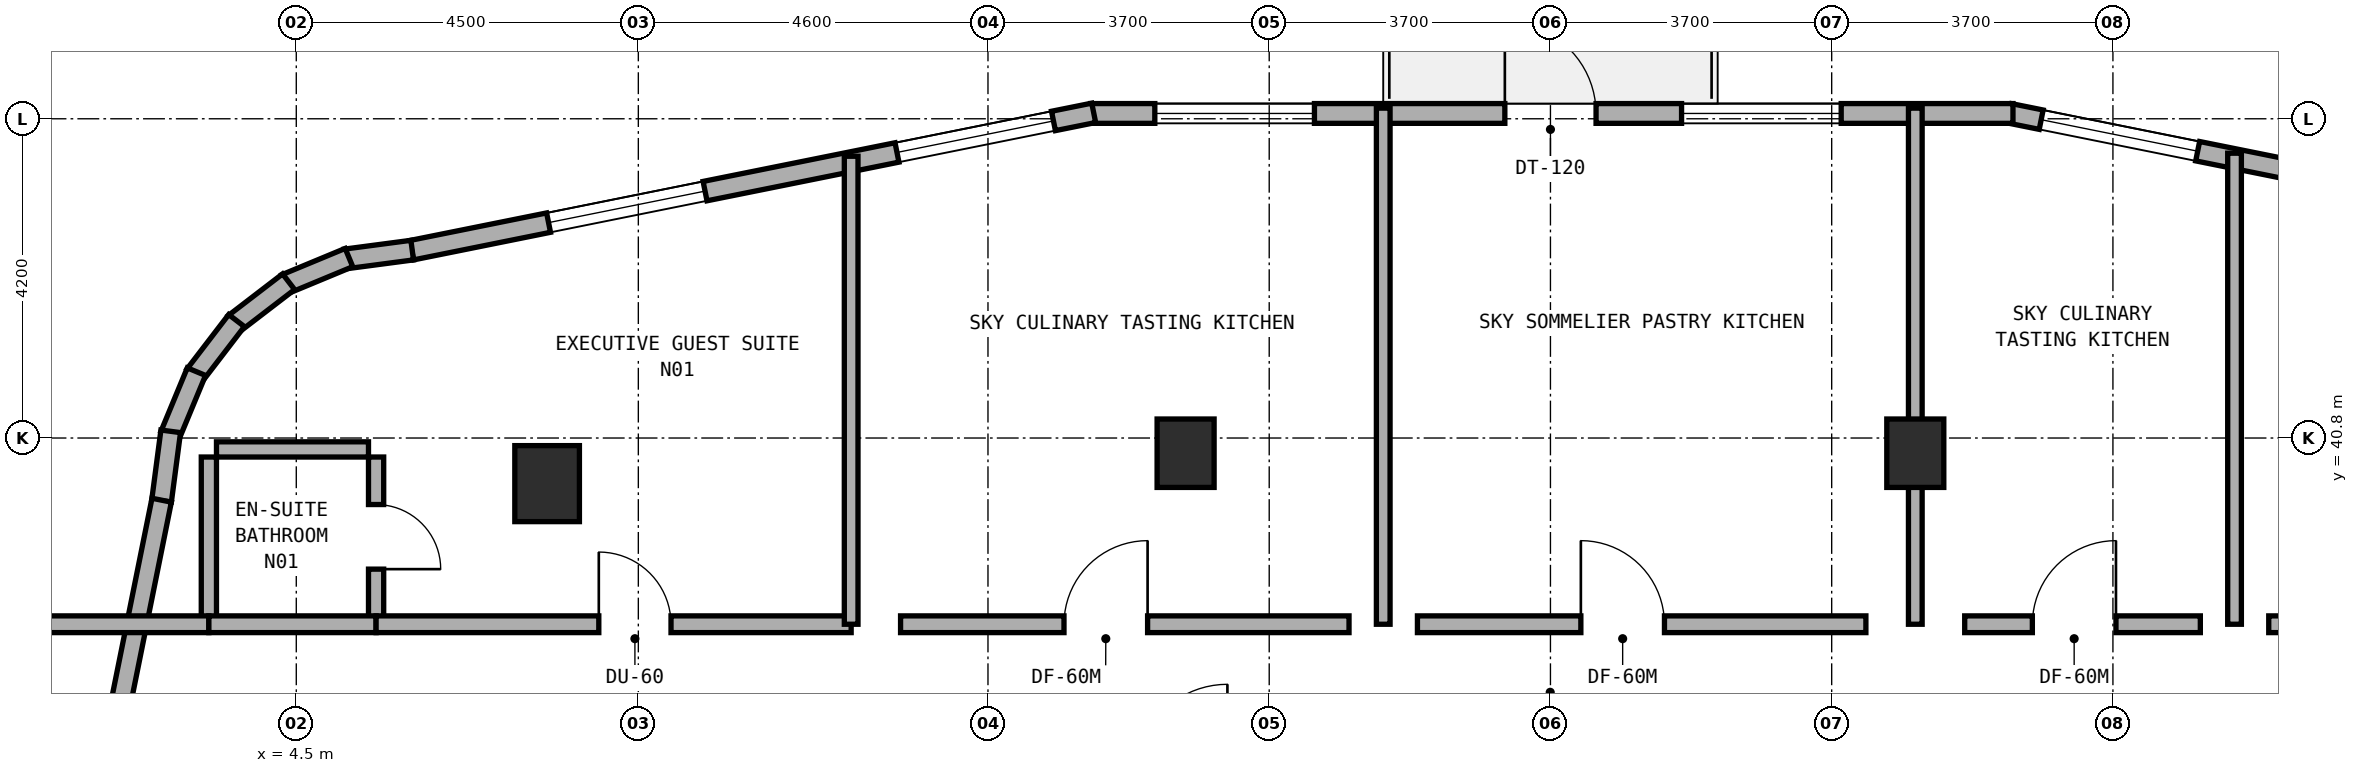
"""IFC4 building model, lengths in metres.
Left out: names, types, materials, properties, quantities, classifications, styles, units other than length and angle.
Written with IfcOpenShell. Run it as: python <this file> out.ifc"""

import sys

from ifc_helpers import new_model, si_unit, direction, frame, frame_2d, origin, origin_2d, place, context, subcontext, project, spatial, rectangle, extrude, element, fill, save


model = new_model("IFC4")
c1 = context("Model", 3, precision=1e-05, world=origin(), true_north=direction((0.0, 1.0)))
c2 = subcontext(c1, "Body", "Model", "MODEL_VIEW")
j1 = project(units=[si_unit("LENGTHUNIT", "METRE"), si_unit("PLANEANGLEUNIT", "RADIAN")], contexts=[c1])
p1 = place(None, origin())
s1 = spatial("IfcSite", under=j1, at=p1, CompositionType="ELEMENT")
p2 = place(p1, origin())
s2 = spatial("IfcBuilding", under=s1, at=p2, CompositionType="ELEMENT")
p3 = place(p2, frame((0.0, 0.0, 166.0)))
s3 = spatial("IfcBuildingStorey", under=s2, at=p3, CompositionType="ELEMENT", Elevation=166.0)
for number, where, z_axis, x_axis in (
    (1, (16.2, 40.6, 0.0), (0.0, 0.0, 1.0), (1.0, 0.0, 0.0)),
    (2, (25.8, 40.6, 0.0), (0.0, 0.0, 1.0), (1.0, 0.0, 0.0)),
):
    element("IfcColumn", number, at=place(p3, frame(where, z_axis=z_axis, x_axis=x_axis)), inside=s3, PredefinedType="COLUMN", context=c2, shape_type="SweptSolid", body=[
        extrude(rectangle(XDim=0.75, YDim=0.9, at=origin_2d()), origin(), (0.0, 0.0, 1.0), 3.5),
    ])
p4 = place(p3, frame((7.8, 40.2, 0.0), z_axis=(0.0, 0.0, 1.0), x_axis=(1.0, 0.0, 0.0)))
e3 = element("IfcColumn", 3, at=p4, inside=s3, PredefinedType="COLUMN", context=c2, shape_type="SweptSolid", body=[
    extrude(rectangle(XDim=0.85, YDim=1.0, at=origin_2d()), origin(), (0.0, 0.0, 1.0), 3.5),
])
p5 = place(p3, frame((35.982, 43.271, 0.0), z_axis=(0.0, 0.0, 1.0), x_axis=(-0.980317172899, 0.197429077186, 0.0)))
e4 = element("IfcWall", 4, at=p5, inside=s3, PredefinedType="STANDARD", context=c2, shape_type="SweptSolid", body=[
    extrude(rectangle(XDim=9.117, YDim=0.26, at=frame_2d((4.559, 0.0))), origin(), (0.0, 0.0, 1.0), 3.22),
])
p6 = place(p5, frame((2.885, 0.0, 0.85)))
e5 = element("IfcOpeningElement", 5, at=p6, cuts=e4, PredefinedType="OPENING", context=c2, shape_type="SweptSolid", body=[
    extrude(rectangle(XDim=2.1, YDim=1.5, at=frame_2d((1.05, 0.75))), frame((0.0, 0.14, 0.0), z_axis=(0.0, -1.0, 0.0), x_axis=(1.0, 0.0, 0.0)), (0.0, 0.0, 1.0), 0.28),
])
p7 = place(p5, frame((6.597, 0.0, 0.85)))
e6 = element("IfcOpeningElement", 6, at=p7, cuts=e4, PredefinedType="OPENING", context=c2, shape_type="SweptSolid", body=[
    extrude(rectangle(XDim=2.1, YDim=1.5, at=frame_2d((1.05, 0.75))), frame((0.0, 0.14, 0.0), z_axis=(0.0, -1.0, 0.0), x_axis=(1.0, 0.0, 0.0)), (0.0, 0.0, 1.0), 0.28),
])
p8 = place(p3, frame((27.085, 45.07, 0.0), z_axis=(0.0, 0.0, 1.0), x_axis=(-1.0, 0.0, 0.0)))
e7 = element("IfcWall", 7, at=p8, inside=s3, PredefinedType="STANDARD", context=c2, shape_type="SweptSolid", body=[
    extrude(rectangle(XDim=12.135, YDim=0.26, at=frame_2d((6.067, 0.0))), origin(), (0.0, 0.0, 1.0), 3.22),
])
p9 = place(p8, frame((5.485, 0.0, 0.0)))
e8 = element("IfcOpeningElement", 8, at=p9, cuts=e7, PredefinedType="OPENING", context=c2, shape_type="SweptSolid", body=[
    extrude(rectangle(XDim=1.2, YDim=2.15, at=frame_2d((0.6, 1.075))), frame((0.0, 0.14, 0.0), z_axis=(0.0, -1.0, 0.0), x_axis=(1.0, 0.0, 0.0)), (0.0, 0.0, 1.0), 0.28),
])
p10 = place(p8, frame((2.26, 0.0, 0.85)))
e9 = element("IfcOpeningElement", 9, at=p10, cuts=e7, PredefinedType="OPENING", context=c2, shape_type="SweptSolid", body=[
    extrude(rectangle(XDim=2.1, YDim=1.5, at=frame_2d((1.05, 0.75))), frame((0.0, 0.14, 0.0), z_axis=(0.0, -1.0, 0.0), x_axis=(1.0, 0.0, 0.0)), (0.0, 0.0, 1.0), 0.28),
])
p11 = place(p8, frame((9.19, 0.0, 0.85)))
e10 = element("IfcOpeningElement", 10, at=p11, cuts=e7, PredefinedType="OPENING", context=c2, shape_type="SweptSolid", body=[
    extrude(rectangle(XDim=2.1, YDim=1.5, at=frame_2d((1.05, 0.75))), frame((0.0, 0.14, 0.0), z_axis=(0.0, -1.0, 0.0), x_axis=(1.0, 0.0, 0.0)), (0.0, 0.0, 1.0), 0.28),
])
p12 = place(p3, frame((14.991, 45.078, 0.0), z_axis=(0.0, 0.0, 1.0), x_axis=(-0.980321298532, -0.197408590603, 0.0)))
e11 = element("IfcWall", 11, at=p12, inside=s3, PredefinedType="STANDARD", context=c2, shape_type="SweptSolid", body=[
    extrude(rectangle(XDim=9.153, YDim=0.26, at=frame_2d((4.577, 0.0))), origin(), (0.0, 0.0, 1.0), 3.22),
])
p13 = place(p12, frame((0.54, 0.0, 0.85)))
e12 = element("IfcOpeningElement", 12, at=p13, cuts=e11, PredefinedType="OPENING", context=c2, shape_type="SweptSolid", body=[
    extrude(rectangle(XDim=2.1, YDim=1.5, at=frame_2d((1.05, 0.75))), frame((0.0, 0.14, 0.0), z_axis=(0.0, -1.0, 0.0), x_axis=(1.0, 0.0, 0.0)), (0.0, 0.0, 1.0), 0.28),
])
p14 = place(p12, frame((5.216, 0.0, 0.85)))
e13 = element("IfcOpeningElement", 13, at=p14, cuts=e11, PredefinedType="OPENING", context=c2, shape_type="SweptSolid", body=[
    extrude(rectangle(XDim=2.1, YDim=1.5, at=frame_2d((1.05, 0.75))), frame((0.0, 0.14, 0.0), z_axis=(0.0, -1.0, 0.0), x_axis=(1.0, 0.0, 0.0)), (0.0, 0.0, 1.0), 0.28),
])
p15 = place(p3, frame((6.025, 43.272, 0.0), z_axis=(0.0, 0.0, 1.0), x_axis=(-0.991388484223, -0.130953706898, 0.0)))
e14 = element("IfcWall", 14, at=p15, inside=s3, PredefinedType="STANDARD", context=c2, shape_type="SweptSolid", body=[
    extrude(rectangle(XDim=0.885, YDim=0.26, at=frame_2d((0.443, 0.0))), origin(), (0.0, 0.0, 1.0), 3.22),
])
p16 = place(p3, frame((5.193, 43.174, 0.0), z_axis=(0.0, 0.0, 1.0), x_axis=(-0.923627776508, -0.383290660547, 0.0)))
e15 = element("IfcWall", 15, at=p16, inside=s3, PredefinedType="STANDARD", context=c2, shape_type="SweptSolid", body=[
    extrude(rectangle(XDim=0.903, YDim=0.26, at=frame_2d((0.452, 0.0))), origin(), (0.0, 0.0, 1.0), 3.22),
])
p17 = place(p3, frame((4.399, 42.856, 0.0), z_axis=(0.0, 0.0, 1.0), x_axis=(-0.793458244748, -0.608624690463, 0.0)))
e16 = element("IfcWall", 16, at=p17, inside=s3, PredefinedType="STANDARD", context=c2, shape_type="SweptSolid", body=[
    extrude(rectangle(XDim=0.902, YDim=0.26, at=frame_2d((0.451, 0.0))), origin(), (0.0, 0.0, 1.0), 3.22),
])
p18 = place(p3, frame((3.714, 42.345, 0.0), z_axis=(0.0, 0.0, 1.0), x_axis=(-0.608494022858, -0.793558456666, 0.0)))
e17 = element("IfcWall", 17, at=p18, inside=s3, PredefinedType="STANDARD", context=c2, shape_type="SweptSolid", body=[
    extrude(rectangle(XDim=0.902, YDim=0.26, at=frame_2d((0.451, 0.0))), origin(), (0.0, 0.0, 1.0), 3.22),
])
p19 = place(p3, frame((3.186, 41.673, 0.0), z_axis=(0.0, 0.0, 1.0), x_axis=(-0.383155708213, -0.923683767999, 0.0)))
e18 = element("IfcWall", 18, at=p19, inside=s3, PredefinedType="STANDARD", context=c2, shape_type="SweptSolid", body=[
    extrude(rectangle(XDim=0.903, YDim=0.26, at=frame_2d((0.451, 0.0))), origin(), (0.0, 0.0, 1.0), 3.22),
])
p20 = place(p3, frame((2.848, 40.888, 0.0), z_axis=(0.0, 0.0, 1.0), x_axis=(-0.130200706103, -0.991487658083, 0.0)))
e19 = element("IfcWall", 19, at=p20, inside=s3, PredefinedType="STANDARD", context=c2, shape_type="SweptSolid", body=[
    extrude(rectangle(XDim=0.921, YDim=0.26, at=frame_2d((0.46, 0.0))), origin(), (0.0, 0.0, 1.0), 3.22),
])
p21 = place(p3, frame((2.729, 39.982, 0.0), z_axis=(0.0, 0.0, 1.0), x_axis=(-0.197435082048, -0.980315963543, 0.0)))
e20 = element("IfcWall", 20, at=p21, inside=s3, PredefinedType="STANDARD", context=c2, shape_type="SweptSolid", body=[
    extrude(rectangle(XDim=9.183, YDim=0.26, at=frame_2d((4.591, 0.0))), origin(), (0.0, 0.0, 1.0), 3.22),
])
p22 = place(p21, frame((4.436, 0.0, 0.85)))
e21 = element("IfcOpeningElement", 21, at=p22, cuts=e20, PredefinedType="OPENING", context=c2, shape_type="SweptSolid", body=[
    extrude(rectangle(XDim=2.1, YDim=1.5, at=frame_2d((1.05, 0.75))), frame((0.0, 0.14, 0.0), z_axis=(0.0, -1.0, 0.0), x_axis=(1.0, 0.0, 0.0)), (0.0, 0.0, 1.0), 0.28),
])
p23 = place(p3, frame((5.55, 38.45, 0.0), z_axis=(0.0, 0.0, 1.0), x_axis=(0.0, 1.0, 0.0)))
e22 = element("IfcWall", 22, at=p23, inside=s3, PredefinedType="PLUMBINGWALL", context=c2, shape_type="SweptSolid", body=[
    extrude(rectangle(XDim=2.1, YDim=0.2, at=frame_2d((1.05, 0.0))), origin(), (0.0, 0.0, 1.0), 3.22),
])
p24 = place(p23, frame((0.625, 0.0, 0.0)))
e23 = element("IfcOpeningElement", 23, at=p24, cuts=e22, PredefinedType="OPENING", context=c2, shape_type="SweptSolid", body=[
    extrude(rectangle(XDim=0.85, YDim=2.1, at=frame_2d((0.425, 1.05))), frame((0.0, 0.11, 0.0), z_axis=(0.0, -1.0, 0.0), x_axis=(1.0, 0.0, 0.0)), (0.0, 0.0, 1.0), 0.22),
])
p25 = place(p3, frame((3.45, 40.65, 0.0), z_axis=(0.0, 0.0, 1.0), x_axis=(1.0, 0.0, 0.0)))
e24 = element("IfcWall", 24, at=p25, inside=s3, PredefinedType="PLUMBINGWALL", context=c2, shape_type="SweptSolid", body=[
    extrude(rectangle(XDim=2.0, YDim=0.2, at=frame_2d((1.0, 0.0))), origin(), (0.0, 0.0, 1.0), 3.22),
])
p26 = place(p3, frame((3.35, 38.45, 0.0), z_axis=(0.0, 0.0, 1.0), x_axis=(0.0, 1.0, 0.0)))
e25 = element("IfcWall", 25, at=p26, inside=s3, PredefinedType="PLUMBINGWALL", context=c2, shape_type="SweptSolid", body=[
    extrude(rectangle(XDim=2.1, YDim=0.2, at=frame_2d((1.05, 0.0))), origin(), (0.0, 0.0, 1.0), 3.22),
])
p27 = place(p3, frame((0.96, 38.35, 0.0), z_axis=(0.0, 0.0, 1.0), x_axis=(1.0, 0.0, 0.0)))
e26 = element("IfcWall", 26, at=p27, inside=s3, PredefinedType="SOLIDWALL", context=c2, shape_type="SweptSolid", body=[
    extrude(rectangle(XDim=2.39, YDim=0.22, at=frame_2d((1.195, 0.0))), origin(), (0.0, 0.0, 1.0), 3.22),
])
p28 = place(p3, frame((3.35, 38.35, 0.0), z_axis=(0.0, 0.0, 1.0), x_axis=(1.0, 0.0, 0.0)))
e27 = element("IfcWall", 27, at=p28, inside=s3, PredefinedType="SOLIDWALL", context=c2, shape_type="SweptSolid", body=[
    extrude(rectangle(XDim=2.2, YDim=0.22, at=frame_2d((1.1, 0.0))), origin(), (0.0, 0.0, 1.0), 3.22),
])
p29 = place(p3, frame((5.55, 38.35, 0.0), z_axis=(0.0, 0.0, 1.0), x_axis=(1.0, 0.0, 0.0)))
e28 = element("IfcWall", 28, at=p29, inside=s3, PredefinedType="SOLIDWALL", context=c2, shape_type="SweptSolid", body=[
    extrude(rectangle(XDim=6.25, YDim=0.22, at=frame_2d((3.125, 0.0))), origin(), (0.0, 0.0, 1.0), 2.795),
])
p30 = place(p29, frame((2.93, 0.0, 0.0)))
e29 = element("IfcOpeningElement", 29, at=p30, cuts=e28, PredefinedType="OPENING", context=c2, shape_type="SweptSolid", body=[
    extrude(rectangle(XDim=0.95, YDim=2.1, at=frame_2d((0.475, 1.05))), frame((0.0, 0.12, 0.0), z_axis=(0.0, -1.0, 0.0), x_axis=(1.0, 0.0, 0.0)), (0.0, 0.0, 1.0), 0.24),
])
p31 = place(p3, frame((11.8, 38.35, 0.0), z_axis=(0.0, 0.0, 1.0), x_axis=(0.0, 1.0, 0.0)))
e30 = element("IfcWall", 30, at=p31, inside=s3, PredefinedType="SOLIDWALL", context=c2, shape_type="SweptSolid", body=[
    extrude(rectangle(XDim=6.157, YDim=0.18, at=frame_2d((3.079, 0.0))), origin(), (0.0, 0.0, 1.0), 2.835),
])
p32 = place(p3, frame((18.8, 38.35, 0.0), z_axis=(0.0, 0.0, 1.0), x_axis=(0.0, 1.0, 0.0)))
e31 = element("IfcWall", 31, at=p32, inside=s3, PredefinedType="SOLIDWALL", context=c2, shape_type="SweptSolid", body=[
    extrude(rectangle(XDim=6.79, YDim=0.18, at=frame_2d((3.395, 0.0))), origin(), (0.0, 0.0, 1.0), 2.835),
])
p33 = place(p3, frame((12.45, 38.35, 0.0), z_axis=(0.0, 0.0, 1.0), x_axis=(1.0, 0.0, 0.0)))
e32 = element("IfcWall", 32, at=p33, inside=s3, PredefinedType="SOLIDWALL", context=c2, shape_type="SweptSolid", body=[
    extrude(rectangle(XDim=5.9, YDim=0.22, at=frame_2d((2.95, 0.0))), origin(), (0.0, 0.0, 1.0), 2.795),
])
p34 = place(p33, frame((2.15, 0.0, 0.0)))
e33 = element("IfcOpeningElement", 33, at=p34, cuts=e32, PredefinedType="OPENING", context=c2, shape_type="SweptSolid", body=[
    extrude(rectangle(XDim=1.1, YDim=2.1, at=frame_2d((0.55, 1.05))), frame((0.0, 0.12, 0.0), z_axis=(0.0, -1.0, 0.0), x_axis=(1.0, 0.0, 0.0)), (0.0, 0.0, 1.0), 0.24),
])
p35 = place(p3, frame((19.25, 38.35, 0.0), z_axis=(0.0, 0.0, 1.0), x_axis=(1.0, 0.0, 0.0)))
e34 = element("IfcWall", 34, at=p35, inside=s3, PredefinedType="SOLIDWALL", context=c2, shape_type="SweptSolid", body=[
    extrude(rectangle(XDim=5.9, YDim=0.22, at=frame_2d((2.95, 0.0))), origin(), (0.0, 0.0, 1.0), 3.22),
])
p36 = place(p35, frame((2.15, 0.0, 0.0)))
e35 = element("IfcOpeningElement", 35, at=p36, cuts=e34, PredefinedType="OPENING", context=c2, shape_type="SweptSolid", body=[
    extrude(rectangle(XDim=1.1, YDim=2.1, at=frame_2d((0.55, 1.05))), frame((0.0, 0.12, 0.0), z_axis=(0.0, -1.0, 0.0), x_axis=(1.0, 0.0, 0.0)), (0.0, 0.0, 1.0), 0.24),
])
p37 = place(p3, frame((25.8, 38.35, 0.0), z_axis=(0.0, 0.0, 1.0), x_axis=(0.0, 1.0, 0.0)))
e36 = element("IfcWall", 36, at=p37, inside=s3, PredefinedType="SOLIDWALL", context=c2, shape_type="SweptSolid", body=[
    extrude(rectangle(XDim=6.79, YDim=0.18, at=frame_2d((3.395, 0.0))), origin(), (0.0, 0.0, 1.0), 2.795),
])
p38 = place(p3, frame((30.0, 38.35, 0.0), z_axis=(0.0, 0.0, 1.0), x_axis=(0.0, 1.0, 0.0)))
e37 = element("IfcWall", 37, at=p38, inside=s3, PredefinedType="SOLIDWALL", context=c2, shape_type="SweptSolid", body=[
    extrude(rectangle(XDim=6.197, YDim=0.18, at=frame_2d((3.099, 0.0))), origin(), (0.0, 0.0, 1.0), 2.835),
])
p39 = place(p3, frame((26.45, 38.35, 0.0), z_axis=(0.0, 0.0, 1.0), x_axis=(1.0, 0.0, 0.0)))
e38 = element("IfcWall", 38, at=p39, inside=s3, PredefinedType="SOLIDWALL", context=c2, shape_type="SweptSolid", body=[
    extrude(rectangle(XDim=3.1, YDim=0.22, at=frame_2d((1.55, 0.0))), origin(), (0.0, 0.0, 1.0), 2.795),
])
p40 = place(p39, frame((0.89, 0.0, 0.0)))
e39 = element("IfcOpeningElement", 39, at=p40, cuts=e38, PredefinedType="OPENING", context=c2, shape_type="SweptSolid", body=[
    extrude(rectangle(XDim=1.1, YDim=2.1, at=frame_2d((0.55, 1.05))), frame((0.0, 0.12, 0.0), z_axis=(0.0, -1.0, 0.0), x_axis=(1.0, 0.0, 0.0)), (0.0, 0.0, 1.0), 0.24),
])
p41 = place(p3, frame((30.45, 38.35, 0.0), z_axis=(0.0, 0.0, 1.0), x_axis=(1.0, 0.0, 0.0)))
e40 = element("IfcWall", 40, at=p41, inside=s3, PredefinedType="SOLIDWALL", context=c2, shape_type="SweptSolid", body=[
    extrude(rectangle(XDim=3.1, YDim=0.22, at=frame_2d((1.55, 0.0))), origin(), (0.0, 0.0, 1.0), 3.22),
])
p42 = place(p41, frame((0.89, 0.0, 0.0)))
e41 = element("IfcOpeningElement", 41, at=p42, cuts=e40, PredefinedType="OPENING", context=c2, shape_type="SweptSolid", body=[
    extrude(rectangle(XDim=1.1, YDim=2.1, at=frame_2d((0.55, 1.05))), frame((0.0, 0.12, 0.0), z_axis=(0.0, -1.0, 0.0), x_axis=(1.0, 0.0, 0.0)), (0.0, 0.0, 1.0), 0.24),
])
p43 = place(p7, origin())
e42 = element("IfcWindow", 42, at=p43, inside=s3, PartitioningType="SINGLE_PANEL", PredefinedType="WINDOW", context=c2, shape_type="SweptSolid", body=[
    extrude(rectangle(XDim=2.1, YDim=1.5, at=frame_2d((1.05, 0.75))), frame((0.0, 0.03, 0.0), z_axis=(0.0, -1.0, 0.0), x_axis=(1.0, 0.0, 0.0)), (0.0, 0.0, 1.0), 0.06),
])
fill(e6, e42)
p44 = place(p9, frame((1.2, 0.0, 0.0), z_axis=(0.0, 0.0, 1.0), x_axis=(-1.0, 0.0, 0.0)))
e43 = element("IfcDoor", 43, at=p44, inside=s3, OperationType="SINGLE_SWING_LEFT", PredefinedType="DOOR", context=c2, shape_type="SweptSolid", body=[
    extrude(rectangle(XDim=1.2, YDim=2.15, at=frame_2d((0.6, 1.075))), frame((0.0, 0.025, 0.0), z_axis=(0.0, -1.0, 0.0), x_axis=(1.0, 0.0, 0.0)), (0.0, 0.0, 1.0), 0.05),
])
fill(e8, e43)
p45 = place(p10, origin())
e44 = element("IfcWindow", 44, at=p45, inside=s3, PartitioningType="SINGLE_PANEL", PredefinedType="WINDOW", context=c2, shape_type="SweptSolid", body=[
    extrude(rectangle(XDim=2.1, YDim=1.5, at=frame_2d((1.05, 0.75))), frame((0.0, 0.03, 0.0), z_axis=(0.0, -1.0, 0.0), x_axis=(1.0, 0.0, 0.0)), (0.0, 0.0, 1.0), 0.06),
])
fill(e9, e44)
p46 = place(p11, origin())
e45 = element("IfcWindow", 45, at=p46, inside=s3, PartitioningType="SINGLE_PANEL", PredefinedType="WINDOW", context=c2, shape_type="SweptSolid", body=[
    extrude(rectangle(XDim=2.1, YDim=1.5, at=frame_2d((1.05, 0.75))), frame((0.0, 0.03, 0.0), z_axis=(0.0, -1.0, 0.0), x_axis=(1.0, 0.0, 0.0)), (0.0, 0.0, 1.0), 0.06),
])
fill(e10, e45)
p47 = place(p13, origin())
e46 = element("IfcWindow", 46, at=p47, inside=s3, PartitioningType="SINGLE_PANEL", PredefinedType="WINDOW", context=c2, shape_type="SweptSolid", body=[
    extrude(rectangle(XDim=2.1, YDim=1.5, at=frame_2d((1.05, 0.75))), frame((0.0, 0.03, 0.0), z_axis=(0.0, -1.0, 0.0), x_axis=(1.0, 0.0, 0.0)), (0.0, 0.0, 1.0), 0.06),
])
fill(e12, e46)
p48 = place(p14, origin())
e47 = element("IfcWindow", 47, at=p48, inside=s3, PartitioningType="SINGLE_PANEL", PredefinedType="WINDOW", context=c2, shape_type="SweptSolid", body=[
    extrude(rectangle(XDim=2.1, YDim=1.5, at=frame_2d((1.05, 0.75))), frame((0.0, 0.03, 0.0), z_axis=(0.0, -1.0, 0.0), x_axis=(1.0, 0.0, 0.0)), (0.0, 0.0, 1.0), 0.06),
])
fill(e13, e47)
p49 = place(p24, frame((0.85, 0.0, 0.0), z_axis=(0.0, 0.0, 1.0), x_axis=(-1.0, 0.0, 0.0)))
e48 = element("IfcDoor", 48, at=p49, inside=s3, OperationType="SINGLE_SWING_RIGHT", PredefinedType="DOOR", context=c2, shape_type="SweptSolid", body=[
    extrude(rectangle(XDim=0.85, YDim=2.1, at=frame_2d((0.425, 1.05))), frame((0.0, 0.025, 0.0), z_axis=(0.0, -1.0, 0.0), x_axis=(1.0, 0.0, 0.0)), (0.0, 0.0, 1.0), 0.05),
])
fill(e23, e48)
p50 = place(p30, origin())
e49 = element("IfcDoor", 49, at=p50, inside=s3, OperationType="SINGLE_SWING_LEFT", PredefinedType="DOOR", context=c2, shape_type="SweptSolid", body=[
    extrude(rectangle(XDim=0.95, YDim=2.1, at=frame_2d((0.475, 1.05))), frame((0.0, 0.025, 0.0), z_axis=(0.0, -1.0, 0.0), x_axis=(1.0, 0.0, 0.0)), (0.0, 0.0, 1.0), 0.05),
])
fill(e29, e49)
p51 = place(p34, origin())
e50 = element("IfcDoor", 50, at=p51, inside=s3, OperationType="SINGLE_SWING_RIGHT", PredefinedType="DOOR", context=c2, shape_type="SweptSolid", body=[
    extrude(rectangle(XDim=1.1, YDim=2.1, at=frame_2d((0.55, 1.05))), frame((0.0, 0.025, 0.0), z_axis=(0.0, -1.0, 0.0), x_axis=(1.0, 0.0, 0.0)), (0.0, 0.0, 1.0), 0.05),
])
fill(e33, e50)
p52 = place(p36, origin())
e51 = element("IfcDoor", 51, at=p52, inside=s3, OperationType="SINGLE_SWING_LEFT", PredefinedType="DOOR", context=c2, shape_type="SweptSolid", body=[
    extrude(rectangle(XDim=1.1, YDim=2.1, at=frame_2d((0.55, 1.05))), frame((0.0, 0.025, 0.0), z_axis=(0.0, -1.0, 0.0), x_axis=(1.0, 0.0, 0.0)), (0.0, 0.0, 1.0), 0.05),
])
fill(e35, e51)
p53 = place(p40, origin())
e52 = element("IfcDoor", 52, at=p53, inside=s3, OperationType="SINGLE_SWING_RIGHT", PredefinedType="DOOR", context=c2, shape_type="SweptSolid", body=[
    extrude(rectangle(XDim=1.1, YDim=2.1, at=frame_2d((0.55, 1.05))), frame((0.0, 0.025, 0.0), z_axis=(0.0, -1.0, 0.0), x_axis=(1.0, 0.0, 0.0)), (0.0, 0.0, 1.0), 0.05),
])
fill(e39, e52)
save(model, sys.argv[1])
